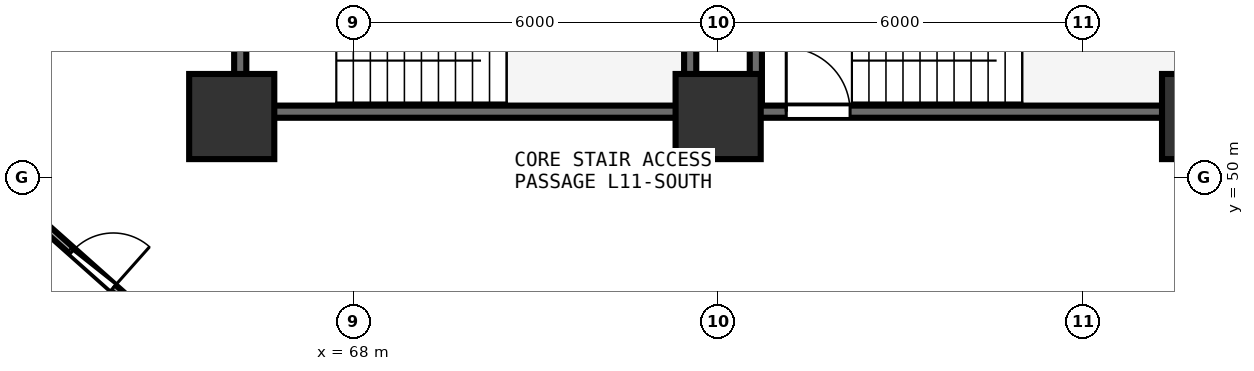
"""IFC4 building model, lengths in metres.
Left out: names, types, materials, properties, quantities, classifications, styles, units other than length and angle.
Written with IfcOpenShell. Run it as: python <this file> out.ifc"""

import sys

from ifc_helpers import new_model, si_unit, direction, frame, frame_2d, origin, origin_2d, place, context, subcontext, project, spatial, rectangle, extrude, element, fill, save


model = new_model("IFC4")
c1 = context("Model", 3, precision=1e-05, world=origin(), true_north=direction((0.0, 1.0)))
c2 = subcontext(c1, "Body", "Model", "MODEL_VIEW")
j1 = project(units=[si_unit("LENGTHUNIT", "METRE"), si_unit("PLANEANGLEUNIT", "RADIAN")], contexts=[c1])
p1 = place(None, origin())
s1 = spatial("IfcSite", under=j1, at=p1, CompositionType="ELEMENT")
p2 = place(p1, origin())
s2 = spatial("IfcBuilding", under=s1, at=p2, CompositionType="ELEMENT")
p3 = place(p2, frame((0.0, 0.0, 45.0)))
s3 = spatial("IfcBuildingStorey", under=s2, at=p3, CompositionType="ELEMENT", Elevation=45.0)
for number, where, z_axis, x_axis in (
    (1, (66.0, 51.0, 0.0), (0.0, 0.0, 1.0), (1.0, 0.0, 0.0)),
    (2, (74.0, 51.0, 0.0), (0.0, 0.0, 1.0), (1.0, 0.0, 0.0)),
    (3, (82.0, 51.0, 0.0), (0.0, 0.0, 1.0), (1.0, 0.0, 0.0)),
):
    element("IfcColumn", number, at=place(p3, frame(where, z_axis=z_axis, x_axis=x_axis)), inside=s3, PredefinedType="PILASTER", context=c2, shape_type="SweptSolid", body=[
        extrude(rectangle(XDim=1.4, YDim=1.4, at=origin_2d()), origin(), (0.0, 0.0, 1.0), 3.75),
    ])
p4 = place(p3, frame((74.0, 51.08, 0.0), z_axis=(0.0, 0.0, 1.0), x_axis=(1.0, 0.0, 0.0)))
e4 = element("IfcWall", 4, at=p4, inside=s3, PredefinedType="SHEAR", context=c2, shape_type="SweptSolid", body=[
    extrude(rectangle(XDim=7.9, YDim=0.2, at=frame_2d((3.95, 0.0))), origin(), (0.0, 0.0, 1.0), 3.49),
])
p5 = place(p4, frame((1.12, 0.0, 0.0)))
e5 = element("IfcOpeningElement", 5, at=p5, cuts=e4, PredefinedType="OPENING", context=c2, shape_type="SweptSolid", body=[
    extrude(rectangle(XDim=1.05, YDim=2.1, at=frame_2d((0.525, 1.05))), frame((0.0, 0.11, 0.0), z_axis=(0.0, -1.0, 0.0), x_axis=(1.0, 0.0, 0.0)), (0.0, 0.0, 1.0), 0.22),
])
p6 = place(p3, frame((74.62, 54.27, 0.0), z_axis=(0.0, 0.0, 1.0), x_axis=(0.0, -1.0, 0.0)))
e6 = element("IfcWall", 6, at=p6, inside=s3, PredefinedType="SHEAR", context=c2, shape_type="SweptSolid", body=[
    extrude(rectangle(XDim=3.07, YDim=0.2, at=frame_2d((1.535, 0.0))), origin(), (0.0, 0.0, 1.0), 3.49),
])
p7 = place(p3, frame((66.26, 51.08, 0.0), z_axis=(0.0, 0.0, 1.0), x_axis=(1.0, 0.0, 0.0)))
e7 = element("IfcWall", 7, at=p7, inside=s3, PredefinedType="SHEAR", context=c2, shape_type="SweptSolid", body=[
    extrude(rectangle(XDim=7.16, YDim=0.2, at=frame_2d((3.58, 0.0))), origin(), (0.0, 0.0, 1.0), 3.49),
])
p8 = place(p3, frame((73.54, 51.2, 0.0), z_axis=(0.0, 0.0, 1.0), x_axis=(0.0, 1.0, 0.0)))
e8 = element("IfcWall", 8, at=p8, inside=s3, PredefinedType="SHEAR", context=c2, shape_type="SweptSolid", body=[
    extrude(rectangle(XDim=3.07, YDim=0.2, at=frame_2d((1.535, 0.0))), origin(), (0.0, 0.0, 1.0), 3.49),
])
p9 = place(p3, frame((66.14, 54.27, 0.0), z_axis=(0.0, 0.0, 1.0), x_axis=(0.0, -1.0, 0.0)))
e9 = element("IfcWall", 9, at=p9, inside=s3, PredefinedType="SHEAR", context=c2, shape_type="SweptSolid", body=[
    extrude(rectangle(XDim=3.07, YDim=0.2, at=frame_2d((1.535, 0.0))), origin(), (0.0, 0.0, 1.0), 3.49),
])
p10 = place(p9, frame((1.01, 0.0, 0.0)))
e10 = element("IfcOpeningElement", 10, at=p10, cuts=e9, PredefinedType="OPENING", context=c2, shape_type="SweptSolid", body=[
    extrude(rectangle(XDim=1.05, YDim=2.1, at=frame_2d((0.525, 1.05))), frame((0.0, 0.11, 0.0), z_axis=(0.0, -1.0, 0.0), x_axis=(1.0, 0.0, 0.0)), (0.0, 0.0, 1.0), 0.22),
])
p11 = place(p3, frame((61.499, 50.454, 0.0), z_axis=(0.0, 0.0, 1.0), x_axis=(0.747393415848, -0.664381729089, 0.0)))
e11 = element("IfcWall", 11, at=p11, inside=s3, PredefinedType="PARTITIONING", context=c2, shape_type="SweptSolid", body=[
    extrude(rectangle(XDim=5.929, YDim=0.12, at=frame_2d((2.965, 0.0))), origin(), (0.0, 0.0, 1.0), 2.875),
])
p12 = place(p11, frame((2.515, 0.0, 0.0)))
e12 = element("IfcOpeningElement", 12, at=p12, cuts=e11, PredefinedType="OPENING", context=c2, shape_type="SweptSolid", body=[
    extrude(rectangle(XDim=0.9, YDim=2.08, at=frame_2d((0.45, 1.04))), frame((0.0, 0.07, 0.0), z_axis=(0.0, -1.0, 0.0), x_axis=(1.0, 0.0, 0.0)), (0.0, 0.0, 1.0), 0.14),
])
p13 = place(p3, frame((79.33, 45.268, 0.0), z_axis=(0.0, 0.0, 1.0), x_axis=(0.864061520755, 0.503386221852, 0.0)))
e13 = element("IfcWall", 13, at=p13, inside=s3, PredefinedType="PARTITIONING", context=c2, shape_type="SweptSolid", body=[
    extrude(rectangle(XDim=6.044, YDim=0.12, at=frame_2d((3.022, 0.0))), origin(), (0.0, 0.0, 1.0), 2.875),
])
p14 = place(p13, frame((2.572, 0.0, 0.0)))
e14 = element("IfcOpeningElement", 14, at=p14, cuts=e13, PredefinedType="OPENING", context=c2, shape_type="SweptSolid", body=[
    extrude(rectangle(XDim=0.9, YDim=2.08, at=frame_2d((0.45, 1.04))), frame((0.0, 0.07, 0.0), z_axis=(0.0, -1.0, 0.0), x_axis=(1.0, 0.0, 0.0)), (0.0, 0.0, 1.0), 0.14),
])
p15 = place(p5, origin())
e15 = element("IfcDoor", 15, at=p15, inside=s3, OperationType="SINGLE_SWING_LEFT", PredefinedType="DOOR", context=c2, shape_type="SweptSolid", body=[
    extrude(rectangle(XDim=1.05, YDim=2.1, at=frame_2d((0.525, 1.05))), frame((0.0, 0.025, 0.0), z_axis=(0.0, -1.0, 0.0), x_axis=(1.0, 0.0, 0.0)), (0.0, 0.0, 1.0), 0.05),
])
fill(e5, e15)
p16 = place(p12, origin())
e16 = element("IfcDoor", 16, at=p16, inside=s3, OperationType="SINGLE_SWING_RIGHT", PredefinedType="DOOR", context=c2, shape_type="SweptSolid", body=[
    extrude(rectangle(XDim=0.9, YDim=2.08, at=frame_2d((0.45, 1.04))), frame((0.0, 0.025, 0.0), z_axis=(0.0, -1.0, 0.0), x_axis=(1.0, 0.0, 0.0)), (0.0, 0.0, 1.0), 0.05),
])
fill(e12, e16)
save(model, sys.argv[1])
